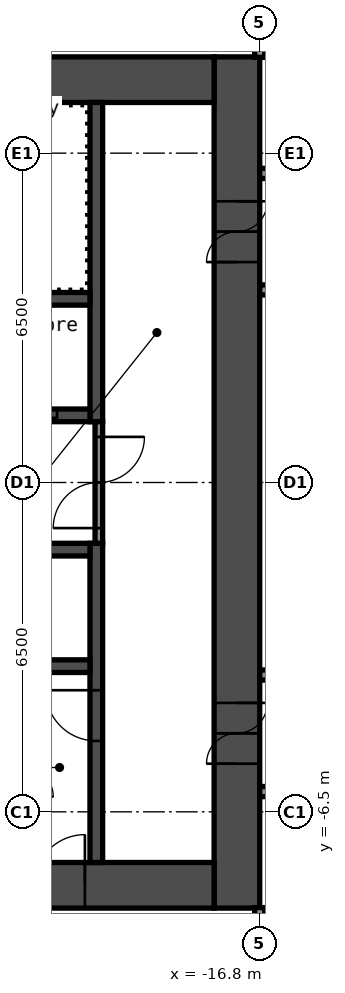
"""IFC4 building model, lengths in metres.
Left out: names, types, materials, properties, quantities, classifications, styles, units other than length and angle.
Written with IfcOpenShell. Run it as: python <this file> out.ifc"""

import sys

from ifc_helpers import new_model, si_unit, direction, frame, frame_2d, origin, place, context, subcontext, project, spatial, rectangle, extrude, element, fill, save


model = new_model("IFC4")
c1 = context("Model", 3, precision=1e-05, world=origin(), true_north=direction((0.0, 1.0)))
c2 = subcontext(c1, "Body", "Model", "MODEL_VIEW")
j1 = project(units=[si_unit("LENGTHUNIT", "METRE"), si_unit("PLANEANGLEUNIT", "RADIAN")], contexts=[c1])
p1 = place(None, origin())
s1 = spatial("IfcSite", under=j1, at=p1, CompositionType="ELEMENT")
p2 = place(p1, origin())
s2 = spatial("IfcBuilding", under=s1, at=p2, CompositionType="ELEMENT")
p3 = place(p2, frame((0.0, 0.0, 23.0)))
s3 = spatial("IfcBuildingStorey", under=s2, at=p3, CompositionType="ELEMENT", Elevation=23.0)
p4 = place(p3, frame((-17.25, -8.4, 0.0), z_axis=(0.0, 0.0, 1.0), x_axis=(0.0, 1.0, 0.0)))
e1 = element("IfcWall", 1, at=p4, inside=s3, PredefinedType="SHEAR", context=c2, shape_type="SweptSolid", body=[
    extrude(rectangle(XDim=16.8, YDim=0.9, at=frame_2d((8.4, 0.0))), origin(), (0.0, 0.0, 1.0), 2.8),
])
p5 = place(p4, frame((12.75, 0.0, 0.0)))
e2 = element("IfcOpeningElement", 2, at=p5, cuts=e1, PredefinedType="OPENING", context=c2, shape_type="SweptSolid", body=[
    extrude(rectangle(XDim=1.2, YDim=2.1, at=frame_2d((0.6, 1.05))), frame((0.0, 0.46, 0.0), z_axis=(0.0, -1.0, 0.0), x_axis=(1.0, 0.0, 0.0)), (0.0, 0.0, 1.0), 0.92),
])
p6 = place(p4, frame((2.85, 0.0, 0.0)))
e3 = element("IfcOpeningElement", 3, at=p6, cuts=e1, PredefinedType="OPENING", context=c2, shape_type="SweptSolid", body=[
    extrude(rectangle(XDim=1.2, YDim=2.1, at=frame_2d((0.6, 1.05))), frame((0.0, 0.46, 0.0), z_axis=(0.0, -1.0, 0.0), x_axis=(1.0, 0.0, 0.0)), (0.0, 0.0, 1.0), 0.92),
])
p7 = place(p3, frame((-32.7, 7.95, 0.0), z_axis=(0.0, 0.0, 1.0), x_axis=(1.0, 0.0, 0.0)))
e4 = element("IfcWall", 4, at=p7, inside=s3, PredefinedType="SHEAR", context=c2, shape_type="SweptSolid", body=[
    extrude(rectangle(XDim=15.0, YDim=0.9, at=frame_2d((7.5, 0.0))), origin(), (0.0, 0.0, 1.0), 2.8),
])
p8 = place(p7, frame((3.4, 0.0, 0.0)))
e5 = element("IfcOpeningElement", 5, at=p8, cuts=e4, PredefinedType="OPENING", context=c2, shape_type="SweptSolid", body=[
    extrude(rectangle(XDim=1.2, YDim=2.1, at=frame_2d((0.6, 1.05))), frame((0.0, 0.46, 0.0), z_axis=(0.0, -1.0, 0.0), x_axis=(1.0, 0.0, 0.0)), (0.0, 0.0, 1.0), 0.92),
])
p9 = place(p7, frame((0.75, 0.0, 0.0)))
e6 = element("IfcOpeningElement", 6, at=p9, cuts=e4, PredefinedType="OPENING", context=c2, shape_type="SweptSolid", body=[
    extrude(rectangle(XDim=0.9, YDim=2.1, at=frame_2d((0.45, 1.05))), frame((0.0, 0.46, 0.0), z_axis=(0.0, -1.0, 0.0), x_axis=(1.0, 0.0, 0.0)), (0.0, 0.0, 1.0), 0.92),
])
p10 = place(p3, frame((-32.7, -7.95, 0.0), z_axis=(0.0, 0.0, 1.0), x_axis=(1.0, 0.0, 0.0)))
e7 = element("IfcWall", 7, at=p10, inside=s3, PredefinedType="SHEAR", context=c2, shape_type="SweptSolid", body=[
    extrude(rectangle(XDim=15.0, YDim=0.9, at=frame_2d((7.5, 0.0))), origin(), (0.0, 0.0, 1.0), 2.8),
])
p11 = place(p10, frame((11.45, 0.0, 0.0)))
e8 = element("IfcOpeningElement", 8, at=p11, cuts=e7, PredefinedType="OPENING", context=c2, shape_type="SweptSolid", body=[
    extrude(rectangle(XDim=1.0, YDim=2.1, at=frame_2d((0.5, 1.05))), frame((0.0, 0.46, 0.0), z_axis=(0.0, -1.0, 0.0), x_axis=(1.0, 0.0, 0.0)), (0.0, 0.0, 1.0), 0.92),
])
p12 = place(p3, frame((-20.025, 1.2, 0.0), z_axis=(0.0, 0.0, 1.0), x_axis=(0.0, 1.0, 0.0)))
e9 = element("IfcWall", 9, at=p12, inside=s3, PredefinedType="SHEAR", context=c2, shape_type="SweptSolid", body=[
    extrude(rectangle(XDim=6.3, YDim=0.25, at=frame_2d((3.15, 0.0))), origin(), (0.0, 0.0, 1.0), 2.8),
])
p13 = place(p3, frame((-20.025, -7.5, 0.0), z_axis=(0.0, 0.0, 1.0), x_axis=(0.0, 1.0, 0.0)))
e10 = element("IfcWall", 10, at=p13, inside=s3, PredefinedType="SHEAR", context=c2, shape_type="SweptSolid", body=[
    extrude(rectangle(XDim=6.3, YDim=0.25, at=frame_2d((3.15, 0.0))), origin(), (0.0, 0.0, 1.0), 2.8),
])
p14 = place(p13, frame((2.4, 0.0, 0.0)))
e11 = element("IfcOpeningElement", 11, at=p14, cuts=e10, PredefinedType="OPENING", context=c2, shape_type="SweptSolid", body=[
    extrude(rectangle(XDim=1.0, YDim=2.1, at=frame_2d((0.5, 1.05))), frame((0.0, 0.135, 0.0), z_axis=(0.0, -1.0, 0.0), x_axis=(1.0, 0.0, 0.0)), (0.0, 0.0, 1.0), 0.27),
])
p15 = place(p3, frame((-27.65, 1.325, 0.0), z_axis=(0.0, 0.0, 1.0), x_axis=(1.0, 0.0, 0.0)))
e12 = element("IfcWall", 12, at=p15, inside=s3, PredefinedType="SHEAR", context=c2, shape_type="SweptSolid", body=[
    extrude(rectangle(XDim=7.5, YDim=0.25, at=frame_2d((3.75, 0.0))), origin(), (0.0, 0.0, 1.0), 2.8),
])
p16 = place(p15, frame((5.75, 0.0, 0.0)))
e13 = element("IfcOpeningElement", 13, at=p16, cuts=e12, PredefinedType="OPENING", context=c2, shape_type="SweptSolid", body=[
    extrude(rectangle(XDim=1.1, YDim=2.1, at=frame_2d((0.55, 1.05))), frame((0.0, 0.135, 0.0), z_axis=(0.0, -1.0, 0.0), x_axis=(1.0, 0.0, 0.0)), (0.0, 0.0, 1.0), 0.27),
])
p17 = place(p15, frame((3.35, 0.0, 0.0)))
e14 = element("IfcOpeningElement", 14, at=p17, cuts=e12, PredefinedType="OPENING", context=c2, shape_type="SweptSolid", body=[
    extrude(rectangle(XDim=1.1, YDim=2.1, at=frame_2d((0.55, 1.05))), frame((0.0, 0.135, 0.0), z_axis=(0.0, -1.0, 0.0), x_axis=(1.0, 0.0, 0.0)), (0.0, 0.0, 1.0), 0.27),
])
p18 = place(p15, frame((0.95, 0.0, 0.0)))
e15 = element("IfcOpeningElement", 15, at=p18, cuts=e12, PredefinedType="OPENING", context=c2, shape_type="SweptSolid", body=[
    extrude(rectangle(XDim=1.1, YDim=2.1, at=frame_2d((0.55, 1.05))), frame((0.0, 0.135, 0.0), z_axis=(0.0, -1.0, 0.0), x_axis=(1.0, 0.0, 0.0)), (0.0, 0.0, 1.0), 0.27),
])
for number, where, z_axis, x_axis in (
    (16, (-27.65, 3.625, 0.0), (0.0, 0.0, 1.0), (1.0, 0.0, 0.0)),
    (17, (-27.65, -1.325, 0.0), (0.0, 0.0, 1.0), (1.0, 0.0, 0.0)),
    (18, (-27.65, -3.625, 0.0), (0.0, 0.0, 1.0), (1.0, 0.0, 0.0)),
):
    element("IfcWall", number, at=place(p3, frame(where, z_axis=z_axis, x_axis=x_axis)), inside=s3, PredefinedType="SHEAR", context=c2, shape_type="SweptSolid", body=[
        extrude(rectangle(XDim=7.5, YDim=0.25, at=frame_2d((3.75, 0.0))), origin(), (0.0, 0.0, 1.0), 2.8),
    ])
p19 = place(p3, frame((-19.975, -1.2, 0.0), z_axis=(0.0, 0.0, 1.0), x_axis=(0.0, 1.0, 0.0)))
e19 = element("IfcWall", 19, at=p19, inside=s3, PredefinedType="PARTITIONING", context=c2, shape_type="SweptSolid", body=[
    extrude(rectangle(XDim=2.4, YDim=0.15, at=frame_2d((1.2, 0.0))), origin(), (0.0, 0.0, 1.0), 2.8),
])
p20 = place(p19, frame((0.3, 0.0, 0.0)))
e20 = element("IfcOpeningElement", 20, at=p20, cuts=e19, PredefinedType="OPENING", context=c2, shape_type="SweptSolid", body=[
    extrude(rectangle(XDim=1.8, YDim=2.1, at=frame_2d((0.9, 1.05))), frame((0.0, 0.085, 0.0), z_axis=(0.0, -1.0, 0.0), x_axis=(1.0, 0.0, 0.0)), (0.0, 0.0, 1.0), 0.17),
])
p21 = place(p3, frame((-16.8, -6.1, 0.0), z_axis=(0.0, 0.0, 1.0), x_axis=(1.0, 0.0, 0.0)))
e21 = element("IfcWall", 21, at=p21, inside=s3, PredefinedType="PARTITIONING", context=c2, shape_type="SweptSolid", body=[
    extrude(rectangle(XDim=33.6, YDim=0.2, at=frame_2d((16.8, 0.0))), origin(), (0.0, 0.0, 1.0), 2.8),
])
p22 = place(p21, frame((2.85, 0.0, 0.0)))
e22 = element("IfcOpeningElement", 22, at=p22, cuts=e21, PredefinedType="OPENING", context=c2, shape_type="SweptSolid", body=[
    extrude(rectangle(XDim=1.0, YDim=2.1, at=frame_2d((0.5, 1.05))), frame((0.0, 0.11, 0.0), z_axis=(0.0, -1.0, 0.0), x_axis=(1.0, 0.0, 0.0)), (0.0, 0.0, 1.0), 0.22),
])
p23 = place(p21, frame((4.55, 0.0, 0.0)))
e23 = element("IfcOpeningElement", 23, at=p23, cuts=e21, PredefinedType="OPENING", context=c2, shape_type="SweptSolid", body=[
    extrude(rectangle(XDim=1.0, YDim=2.1, at=frame_2d((0.5, 1.05))), frame((0.0, 0.11, 0.0), z_axis=(0.0, -1.0, 0.0), x_axis=(1.0, 0.0, 0.0)), (0.0, 0.0, 1.0), 0.22),
])
p24 = place(p21, frame((11.25, 0.0, 0.0)))
e24 = element("IfcOpeningElement", 24, at=p24, cuts=e21, PredefinedType="OPENING", context=c2, shape_type="SweptSolid", body=[
    extrude(rectangle(XDim=1.0, YDim=2.1, at=frame_2d((0.5, 1.05))), frame((0.0, 0.11, 0.0), z_axis=(0.0, -1.0, 0.0), x_axis=(1.0, 0.0, 0.0)), (0.0, 0.0, 1.0), 0.22),
])
p25 = place(p21, frame((12.95, 0.0, 0.0)))
e25 = element("IfcOpeningElement", 25, at=p25, cuts=e21, PredefinedType="OPENING", context=c2, shape_type="SweptSolid", body=[
    extrude(rectangle(XDim=1.0, YDim=2.1, at=frame_2d((0.5, 1.05))), frame((0.0, 0.11, 0.0), z_axis=(0.0, -1.0, 0.0), x_axis=(1.0, 0.0, 0.0)), (0.0, 0.0, 1.0), 0.22),
])
p26 = place(p21, frame((20.5, 0.0, 0.0)))
e26 = element("IfcOpeningElement", 26, at=p26, cuts=e21, PredefinedType="OPENING", context=c2, shape_type="SweptSolid", body=[
    extrude(rectangle(XDim=1.0, YDim=2.1, at=frame_2d((0.5, 1.05))), frame((0.0, 0.11, 0.0), z_axis=(0.0, -1.0, 0.0), x_axis=(1.0, 0.0, 0.0)), (0.0, 0.0, 1.0), 0.22),
])
p27 = place(p21, frame((28.05, 0.0, 0.0)))
e27 = element("IfcOpeningElement", 27, at=p27, cuts=e21, PredefinedType="OPENING", context=c2, shape_type="SweptSolid", body=[
    extrude(rectangle(XDim=1.0, YDim=2.1, at=frame_2d((0.5, 1.05))), frame((0.0, 0.11, 0.0), z_axis=(0.0, -1.0, 0.0), x_axis=(1.0, 0.0, 0.0)), (0.0, 0.0, 1.0), 0.22),
])
p28 = place(p21, frame((29.75, 0.0, 0.0)))
e28 = element("IfcOpeningElement", 28, at=p28, cuts=e21, PredefinedType="OPENING", context=c2, shape_type="SweptSolid", body=[
    extrude(rectangle(XDim=1.0, YDim=2.1, at=frame_2d((0.5, 1.05))), frame((0.0, 0.11, 0.0), z_axis=(0.0, -1.0, 0.0), x_axis=(1.0, 0.0, 0.0)), (0.0, 0.0, 1.0), 0.22),
])
p29 = place(p3, frame((-16.8, -3.8, 0.0), z_axis=(0.0, 0.0, 1.0), x_axis=(1.0, 0.0, 0.0)))
e29 = element("IfcWall", 29, at=p29, inside=s3, PredefinedType="PARTITIONING", context=c2, shape_type="SweptSolid", body=[
    extrude(rectangle(XDim=33.6, YDim=0.2, at=frame_2d((16.8, 0.0))), origin(), (0.0, 0.0, 1.0), 2.8),
])
p30 = place(p29, frame((10.64, 0.0, 0.0)))
e30 = element("IfcOpeningElement", 30, at=p30, cuts=e29, PredefinedType="OPENING", context=c2, shape_type="SweptSolid", body=[
    extrude(rectangle(XDim=0.9, YDim=2.1, at=frame_2d((0.45, 1.05))), frame((0.0, 0.11, 0.0), z_axis=(0.0, -1.0, 0.0), x_axis=(1.0, 0.0, 0.0)), (0.0, 0.0, 1.0), 0.22),
])
p31 = place(p29, frame((14.84, 0.0, 0.0)))
e31 = element("IfcOpeningElement", 31, at=p31, cuts=e29, PredefinedType="OPENING", context=c2, shape_type="SweptSolid", body=[
    extrude(rectangle(XDim=0.9, YDim=2.1, at=frame_2d((0.45, 1.05))), frame((0.0, 0.11, 0.0), z_axis=(0.0, -1.0, 0.0), x_axis=(1.0, 0.0, 0.0)), (0.0, 0.0, 1.0), 0.22),
])
p32 = place(p29, frame((26.26, 0.0, 0.0)))
e32 = element("IfcOpeningElement", 32, at=p32, cuts=e29, PredefinedType="OPENING", context=c2, shape_type="SweptSolid", body=[
    extrude(rectangle(XDim=0.9, YDim=2.1, at=frame_2d((0.45, 1.05))), frame((0.0, 0.11, 0.0), z_axis=(0.0, -1.0, 0.0), x_axis=(1.0, 0.0, 0.0)), (0.0, 0.0, 1.0), 0.22),
])
p33 = place(p29, frame((30.46, 0.0, 0.0)))
e33 = element("IfcOpeningElement", 33, at=p33, cuts=e29, PredefinedType="OPENING", context=c2, shape_type="SweptSolid", body=[
    extrude(rectangle(XDim=0.9, YDim=2.1, at=frame_2d((0.45, 1.05))), frame((0.0, 0.11, 0.0), z_axis=(0.0, -1.0, 0.0), x_axis=(1.0, 0.0, 0.0)), (0.0, 0.0, 1.0), 0.22),
])
p34 = place(p3, frame((-16.8, 3.8, 0.0), z_axis=(0.0, 0.0, 1.0), x_axis=(1.0, 0.0, 0.0)))
e34 = element("IfcWall", 34, at=p34, inside=s3, PredefinedType="PARTITIONING", context=c2, shape_type="SweptSolid", body=[
    extrude(rectangle(XDim=33.6, YDim=0.2, at=frame_2d((16.8, 0.0))), origin(), (0.0, 0.0, 1.0), 2.8),
])
p35 = place(p34, frame((2.155, 0.0, 0.0)))
e35 = element("IfcOpeningElement", 35, at=p35, cuts=e34, PredefinedType="OPENING", context=c2, shape_type="SweptSolid", body=[
    extrude(rectangle(XDim=0.9, YDim=2.1, at=frame_2d((0.45, 1.05))), frame((0.0, 0.11, 0.0), z_axis=(0.0, -1.0, 0.0), x_axis=(1.0, 0.0, 0.0)), (0.0, 0.0, 1.0), 0.22),
])
p36 = place(p34, frame((6.355, 0.0, 0.0)))
e36 = element("IfcOpeningElement", 36, at=p36, cuts=e34, PredefinedType="OPENING", context=c2, shape_type="SweptSolid", body=[
    extrude(rectangle(XDim=0.9, YDim=2.1, at=frame_2d((0.45, 1.05))), frame((0.0, 0.11, 0.0), z_axis=(0.0, -1.0, 0.0), x_axis=(1.0, 0.0, 0.0)), (0.0, 0.0, 1.0), 0.22),
])
p37 = place(p34, frame((18.28, 0.0, 0.0)))
e37 = element("IfcOpeningElement", 37, at=p37, cuts=e34, PredefinedType="OPENING", context=c2, shape_type="SweptSolid", body=[
    extrude(rectangle(XDim=0.9, YDim=2.1, at=frame_2d((0.45, 1.05))), frame((0.0, 0.11, 0.0), z_axis=(0.0, -1.0, 0.0), x_axis=(1.0, 0.0, 0.0)), (0.0, 0.0, 1.0), 0.22),
])
p38 = place(p34, frame((22.48, 0.0, 0.0)))
e38 = element("IfcOpeningElement", 38, at=p38, cuts=e34, PredefinedType="OPENING", context=c2, shape_type="SweptSolid", body=[
    extrude(rectangle(XDim=0.9, YDim=2.1, at=frame_2d((0.45, 1.05))), frame((0.0, 0.11, 0.0), z_axis=(0.0, -1.0, 0.0), x_axis=(1.0, 0.0, 0.0)), (0.0, 0.0, 1.0), 0.22),
])
p39 = place(p3, frame((-16.8, 6.1, 0.0), z_axis=(0.0, 0.0, 1.0), x_axis=(1.0, 0.0, 0.0)))
e39 = element("IfcWall", 39, at=p39, inside=s3, PredefinedType="PARTITIONING", context=c2, shape_type="SweptSolid", body=[
    extrude(rectangle(XDim=33.6, YDim=0.2, at=frame_2d((16.8, 0.0))), origin(), (0.0, 0.0, 1.0), 2.8),
])
p40 = place(p39, frame((2.85, 0.0, 0.0)))
e40 = element("IfcOpeningElement", 40, at=p40, cuts=e39, PredefinedType="OPENING", context=c2, shape_type="SweptSolid", body=[
    extrude(rectangle(XDim=1.0, YDim=2.1, at=frame_2d((0.5, 1.05))), frame((0.0, 0.11, 0.0), z_axis=(0.0, -1.0, 0.0), x_axis=(1.0, 0.0, 0.0)), (0.0, 0.0, 1.0), 0.22),
])
p41 = place(p39, frame((4.55, 0.0, 0.0)))
e41 = element("IfcOpeningElement", 41, at=p41, cuts=e39, PredefinedType="OPENING", context=c2, shape_type="SweptSolid", body=[
    extrude(rectangle(XDim=1.0, YDim=2.1, at=frame_2d((0.5, 1.05))), frame((0.0, 0.11, 0.0), z_axis=(0.0, -1.0, 0.0), x_axis=(1.0, 0.0, 0.0)), (0.0, 0.0, 1.0), 0.22),
])
p42 = place(p39, frame((9.545, 0.0, 0.0)))
e42 = element("IfcOpeningElement", 42, at=p42, cuts=e39, PredefinedType="OPENING", context=c2, shape_type="SweptSolid", body=[
    extrude(rectangle(XDim=0.9, YDim=2.1, at=frame_2d((0.45, 1.05))), frame((0.0, 0.11, 0.0), z_axis=(0.0, -1.0, 0.0), x_axis=(1.0, 0.0, 0.0)), (0.0, 0.0, 1.0), 0.22),
])
p43 = place(p39, frame((13.745, 0.0, 0.0)))
e43 = element("IfcOpeningElement", 43, at=p43, cuts=e39, PredefinedType="OPENING", context=c2, shape_type="SweptSolid", body=[
    extrude(rectangle(XDim=0.9, YDim=2.1, at=frame_2d((0.45, 1.05))), frame((0.0, 0.11, 0.0), z_axis=(0.0, -1.0, 0.0), x_axis=(1.0, 0.0, 0.0)), (0.0, 0.0, 1.0), 0.22),
])
p44 = place(p39, frame((19.65, 0.0, 0.0)))
e44 = element("IfcOpeningElement", 44, at=p44, cuts=e39, PredefinedType="OPENING", context=c2, shape_type="SweptSolid", body=[
    extrude(rectangle(XDim=1.0, YDim=2.1, at=frame_2d((0.5, 1.05))), frame((0.0, 0.11, 0.0), z_axis=(0.0, -1.0, 0.0), x_axis=(1.0, 0.0, 0.0)), (0.0, 0.0, 1.0), 0.22),
])
p45 = place(p39, frame((21.35, 0.0, 0.0)))
e45 = element("IfcOpeningElement", 45, at=p45, cuts=e39, PredefinedType="OPENING", context=c2, shape_type="SweptSolid", body=[
    extrude(rectangle(XDim=1.0, YDim=2.1, at=frame_2d((0.5, 1.05))), frame((0.0, 0.11, 0.0), z_axis=(0.0, -1.0, 0.0), x_axis=(1.0, 0.0, 0.0)), (0.0, 0.0, 1.0), 0.22),
])
p46 = place(p39, frame((28.05, 0.0, 0.0)))
e46 = element("IfcOpeningElement", 46, at=p46, cuts=e39, PredefinedType="OPENING", context=c2, shape_type="SweptSolid", body=[
    extrude(rectangle(XDim=1.0, YDim=2.1, at=frame_2d((0.5, 1.05))), frame((0.0, 0.11, 0.0), z_axis=(0.0, -1.0, 0.0), x_axis=(1.0, 0.0, 0.0)), (0.0, 0.0, 1.0), 0.22),
])
p47 = place(p39, frame((29.75, 0.0, 0.0)))
e47 = element("IfcOpeningElement", 47, at=p47, cuts=e39, PredefinedType="OPENING", context=c2, shape_type="SweptSolid", body=[
    extrude(rectangle(XDim=1.0, YDim=2.1, at=frame_2d((0.5, 1.05))), frame((0.0, 0.11, 0.0), z_axis=(0.0, -1.0, 0.0), x_axis=(1.0, 0.0, 0.0)), (0.0, 0.0, 1.0), 0.22),
])
for number, where, z_axis, x_axis in (
    (48, (-16.8, -20.3, 0.0), (0.0, 0.0, 1.0), (0.0, 1.0, 0.0)),
    (49, (-16.8, 8.39, 0.0), (0.0, 0.0, 1.0), (0.0, 1.0, 0.0)),
):
    element("IfcWall", number, at=place(p3, frame(where, z_axis=z_axis, x_axis=x_axis)), inside=s3, PredefinedType="PARTITIONING", context=c2, shape_type="SweptSolid", body=[
        extrude(rectangle(XDim=11.91, YDim=0.2, at=frame_2d((5.955, 0.0))), origin(), (0.0, 0.0, 1.0), 2.8),
    ])
p48 = place(p5, origin())
e50 = element("IfcDoor", 50, at=p48, inside=s3, OperationType="DOUBLE_DOOR_SINGLE_SWING", PredefinedType="DOOR", context=c2, shape_type="SweptSolid", body=[
    extrude(rectangle(XDim=1.2, YDim=2.1, at=frame_2d((0.6, 1.05))), frame((0.0, 0.025, 0.0), z_axis=(0.0, -1.0, 0.0), x_axis=(1.0, 0.0, 0.0)), (0.0, 0.0, 1.0), 0.05),
])
fill(e2, e50)
p49 = place(p6, origin())
e51 = element("IfcDoor", 51, at=p49, inside=s3, OperationType="DOUBLE_DOOR_SINGLE_SWING", PredefinedType="DOOR", context=c2, shape_type="SweptSolid", body=[
    extrude(rectangle(XDim=1.2, YDim=2.1, at=frame_2d((0.6, 1.05))), frame((0.0, 0.025, 0.0), z_axis=(0.0, -1.0, 0.0), x_axis=(1.0, 0.0, 0.0)), (0.0, 0.0, 1.0), 0.05),
])
fill(e3, e51)
p50 = place(p11, origin())
e52 = element("IfcDoor", 52, at=p50, inside=s3, OperationType="SINGLE_SWING_LEFT", PredefinedType="DOOR", context=c2, shape_type="SweptSolid", body=[
    extrude(rectangle(XDim=1.0, YDim=2.1, at=frame_2d((0.5, 1.05))), frame((0.0, 0.025, 0.0), z_axis=(0.0, -1.0, 0.0), x_axis=(1.0, 0.0, 0.0)), (0.0, 0.0, 1.0), 0.05),
])
fill(e8, e52)
p51 = place(p14, origin())
e53 = element("IfcDoor", 53, at=p51, inside=s3, OperationType="SINGLE_SWING_LEFT", PredefinedType="DOOR", context=c2, shape_type="SweptSolid", body=[
    extrude(rectangle(XDim=1.0, YDim=2.1, at=frame_2d((0.5, 1.05))), frame((0.0, 0.025, 0.0), z_axis=(0.0, -1.0, 0.0), x_axis=(1.0, 0.0, 0.0)), (0.0, 0.0, 1.0), 0.05),
])
fill(e11, e53)
p52 = place(p20, origin())
e54 = element("IfcDoor", 54, at=p52, inside=s3, OperationType="DOUBLE_DOOR_SINGLE_SWING", PredefinedType="DOOR", context=c2, shape_type="SweptSolid", body=[
    extrude(rectangle(XDim=1.8, YDim=2.1, at=frame_2d((0.9, 1.05))), frame((0.0, 0.025, 0.0), z_axis=(0.0, -1.0, 0.0), x_axis=(1.0, 0.0, 0.0)), (0.0, 0.0, 1.0), 0.05),
])
fill(e20, e54)
p53 = place(p16, origin())
e55 = element("IfcDoor", 55, at=p53, inside=s3, OperationType="DOUBLE_DOOR_SLIDING", PredefinedType="DOOR", context=c2, shape_type="SweptSolid", body=[
    extrude(rectangle(XDim=1.1, YDim=2.1, at=frame_2d((0.55, 1.05))), frame((0.0, 0.025, 0.0), z_axis=(0.0, -1.0, 0.0), x_axis=(1.0, 0.0, 0.0)), (0.0, 0.0, 1.0), 0.05),
])
fill(e13, e55)
save(model, sys.argv[1])
